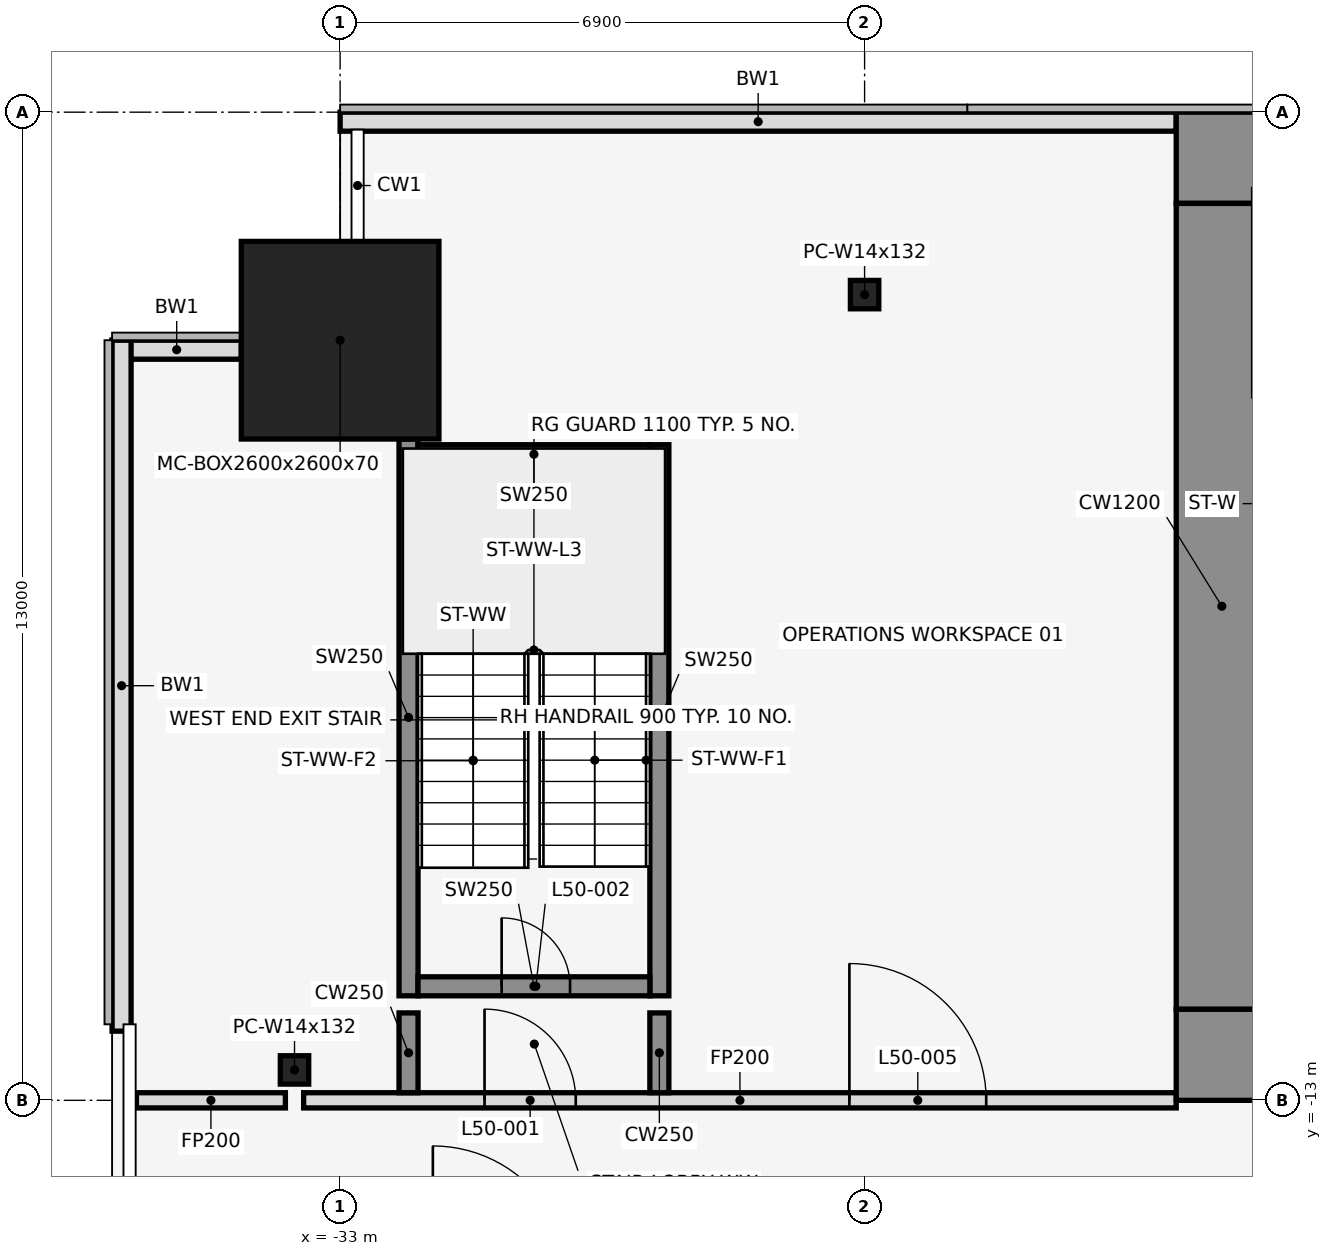
"""IFC4 building model, lengths in metres.
Left out: names, types, materials, properties, quantities, classifications, styles, units other than length and angle.
Written with IfcOpenShell. Run it as: python <this file> out.ifc"""

import sys

from ifc_helpers import new_model, si_unit, direction, frame, frame_2d, origin, origin_2d, place, context, subcontext, project, spatial, rectangle, hollow_rectangle, i_section, extrude, element, fill, save


model = new_model("IFC4")
c1 = context("Model", 3, precision=1e-05, world=origin(), true_north=direction((0.0, 1.0)))
c2 = subcontext(c1, "Body", "Model", "MODEL_VIEW")
j1 = project(units=[si_unit("LENGTHUNIT", "METRE"), si_unit("PLANEANGLEUNIT", "RADIAN")], contexts=[c1])
p1 = place(None, origin())
s1 = spatial("IfcSite", under=j1, at=p1, CompositionType="ELEMENT")
p2 = place(p1, origin())
s2 = spatial("IfcBuilding", under=s1, at=p2, CompositionType="ELEMENT")
p3 = place(p2, frame((0.0, 0.0, 223.7)))
s3 = spatial("IfcBuildingStorey", under=s2, at=p3, CompositionType="ELEMENT", Elevation=223.7)
p4 = place(p3, frame((-33.0, -3.0, 0.0), z_axis=(0.0, 0.0, 1.0), x_axis=(1.0, 0.0, 0.0)))
e1 = element("IfcColumn", 1, at=p4, inside=s3, PredefinedType="COLUMN", context=c2, shape_type="SweptSolid", body=[
    extrude(hollow_rectangle(XDim=2.6, YDim=2.6, WallThickness=0.07, at=origin_2d()), origin(), (0.0, 0.0, 1.0), 4.1),
])
for number, where, z_axis, x_axis in (
    (2, (-26.1, -2.4, 0.0), (0.0, 0.0, 1.0), (1.0, 0.0, 0.0)),
    (3, (-33.6, -12.6, 0.0), (0.0, 0.0, 1.0), (1.0, 0.0, 0.0)),
):
    element("IfcColumn", number, at=place(p3, frame(where, z_axis=z_axis, x_axis=x_axis)), inside=s3, PredefinedType="COLUMN", context=c2, shape_type="SweptSolid", body=[
        extrude(i_section(OverallWidth=0.373, OverallDepth=0.373, WebThickness=0.016, FlangeThickness=0.026, at=origin_2d()), origin(), (0.0, 0.0, 1.0), 4.1),
    ])
p5 = place(p3, frame((-22.0, -0.125, 0.0), z_axis=(0.0, 0.0, 1.0), x_axis=(-1.0, 0.0, 0.0)))
e4 = element("IfcWall", 4, at=p5, inside=s3, PredefinedType="STANDARD", context=c2, shape_type="SweptSolid", body=[
    extrude(rectangle(XDim=11.0, YDim=0.25, at=frame_2d((5.5, 0.0))), origin(), (0.0, 0.0, 1.0), 3.95),
])
p6 = place(p3, frame((-34.3, -3.125, 0.0), z_axis=(0.0, 0.0, 1.0), x_axis=(-1.0, 0.0, 0.0)))
e5 = element("IfcWall", 5, at=p6, inside=s3, PredefinedType="STANDARD", context=c2, shape_type="SweptSolid", body=[
    extrude(rectangle(XDim=1.7, YDim=0.25, at=frame_2d((0.85, 0.0))), origin(), (0.0, 0.0, 1.0), 3.95),
])
p7 = place(p3, frame((-35.875, -3.0, 0.0), z_axis=(0.0, 0.0, 1.0), x_axis=(0.0, -1.0, 0.0)))
e6 = element("IfcWall", 6, at=p7, inside=s3, PredefinedType="STANDARD", context=c2, shape_type="SweptSolid", body=[
    extrude(rectangle(XDim=9.09, YDim=0.25, at=frame_2d((4.545, 0.0))), origin(), (0.0, 0.0, 1.0), 3.95),
])
p8 = place(p3, frame((-32.1, -11.625, 0.0), z_axis=(0.0, 0.0, 1.0), x_axis=(0.0, 1.0, 0.0)))
e7 = element("IfcWall", 7, at=p8, inside=s3, PredefinedType="SHEAR", context=c2, shape_type="SweptSolid", body=[
    extrude(rectangle(XDim=7.325, YDim=0.25, at=frame_2d((3.663, 0.0))), origin(), (0.0, 0.0, 1.0), 4.1),
])
p9 = place(p3, frame((-28.8, -11.625, 0.0), z_axis=(0.0, 0.0, 1.0), x_axis=(0.0, 1.0, 0.0)))
e8 = element("IfcWall", 8, at=p9, inside=s3, PredefinedType="SHEAR", context=c2, shape_type="SweptSolid", body=[
    extrude(rectangle(XDim=7.25, YDim=0.25, at=frame_2d((3.625, 0.0))), origin(), (0.0, 0.0, 1.0), 4.1),
])
p10 = place(p3, frame((-31.975, -11.5, 0.0), z_axis=(0.0, 0.0, 1.0), x_axis=(1.0, 0.0, 0.0)))
e9 = element("IfcWall", 9, at=p10, inside=s3, PredefinedType="SHEAR", context=c2, shape_type="SweptSolid", body=[
    extrude(rectangle(XDim=3.05, YDim=0.25, at=frame_2d((1.525, 0.0))), origin(), (0.0, 0.0, 1.0), 4.1),
])
p11 = place(p10, frame((1.1, 0.0, 0.0)))
e10 = element("IfcOpeningElement", 10, at=p11, cuts=e9, PredefinedType="OPENING", context=c2, shape_type="SweptSolid", body=[
    extrude(rectangle(XDim=0.9, YDim=2.1, at=frame_2d((0.45, 1.05))), frame((0.0, 0.137, 0.0), z_axis=(0.0, -1.0, 0.0), x_axis=(1.0, 0.0, 0.0)), (0.0, 0.0, 1.0), 0.274),
])
p12 = place(p3, frame((-31.975, -4.5, 0.0), z_axis=(0.0, 0.0, 1.0), x_axis=(1.0, 0.0, 0.0)))
e11 = element("IfcWall", 11, at=p12, inside=s3, PredefinedType="SHEAR", context=c2, shape_type="SweptSolid", body=[
    extrude(rectangle(XDim=3.05, YDim=0.25, at=frame_2d((1.525, 0.0))), origin(), (0.0, 0.0, 1.0), 4.1),
])
p13 = place(p3, frame((-35.68, -13.0, 0.0), z_axis=(0.0, 0.0, 1.0), x_axis=(1.0, 0.0, 0.0)))
e12 = element("IfcWall", 12, at=p13, inside=s3, PredefinedType="PARTITIONING", context=c2, shape_type="SweptSolid", body=[
    extrude(rectangle(XDim=1.96, YDim=0.2, at=frame_2d((0.98, 0.0))), origin(), (0.0, 0.0, 1.0), 2.84),
])
p14 = place(p3, frame((-33.48, -13.0, 0.0), z_axis=(0.0, 0.0, 1.0), x_axis=(1.0, 0.0, 0.0)))
e13 = element("IfcWall", 13, at=p14, inside=s3, PredefinedType="PARTITIONING", context=c2, shape_type="SweptSolid", body=[
    extrude(rectangle(XDim=11.48, YDim=0.2, at=frame_2d((5.74, 0.0))), origin(), (0.0, 0.0, 1.0), 2.84),
])
p15 = place(p14, frame((2.38, 0.0, 0.0)))
e14 = element("IfcOpeningElement", 14, at=p15, cuts=e13, PredefinedType="OPENING", context=c2, shape_type="SweptSolid", body=[
    extrude(rectangle(XDim=1.2, YDim=2.1, at=frame_2d((0.6, 1.05))), frame((0.0, 0.112, 0.0), z_axis=(0.0, -1.0, 0.0), x_axis=(1.0, 0.0, 0.0)), (0.0, 0.0, 1.0), 0.224),
])
p16 = place(p14, frame((7.18, 0.0, 0.0)))
e15 = element("IfcOpeningElement", 15, at=p16, cuts=e13, PredefinedType="OPENING", context=c2, shape_type="SweptSolid", body=[
    extrude(rectangle(XDim=1.8, YDim=2.1, at=frame_2d((0.9, 1.05))), frame((0.0, 0.112, 0.0), z_axis=(0.0, -1.0, 0.0), x_axis=(1.0, 0.0, 0.0)), (0.0, 0.0, 1.0), 0.224),
])
for number, where, z_axis, x_axis in (
    (16, (-32.1, -12.9, 0.0), (0.0, 0.0, 1.0), (0.0, 1.0, 0.0)),
    (17, (-28.8, -12.9, 0.0), (0.0, 0.0, 1.0), (0.0, 1.0, 0.0)),
):
    element("IfcWall", number, at=place(p3, frame(where, z_axis=z_axis, x_axis=x_axis)), inside=s3, PredefinedType="SHEAR", context=c2, shape_type="SweptSolid", body=[
        extrude(rectangle(XDim=1.05, YDim=0.25, at=frame_2d((0.525, 0.0))), origin(), (0.0, 0.0, 1.0), 4.1),
    ])
p17 = place(p3, frame((-22.0, -0.6, 0.0), z_axis=(0.0, 0.0, 1.0), x_axis=(1.0, 0.0, 0.0)))
e18 = element("IfcWall", 18, at=p17, inside=s3, PredefinedType="SHEAR", context=c2, shape_type="SweptSolid", body=[
    extrude(rectangle(XDim=44.0, YDim=1.2, at=frame_2d((22.0, 0.0))), origin(), (0.0, 0.0, 1.0), 4.1),
])
p18 = place(p17, frame((18.55, 0.0, 0.0)))
e19 = element("IfcOpeningElement", 19, at=p18, cuts=e18, PredefinedType="OPENING", context=c2, shape_type="SweptSolid", body=[
    extrude(rectangle(XDim=0.9, YDim=2.1, at=frame_2d((0.45, 1.05))), frame((0.0, 0.612, 0.0), z_axis=(0.0, -1.0, 0.0), x_axis=(1.0, 0.0, 0.0)), (0.0, 0.0, 1.0), 1.224),
])
p19 = place(p17, frame((24.55, 0.0, 0.0)))
e20 = element("IfcOpeningElement", 20, at=p19, cuts=e18, PredefinedType="OPENING", context=c2, shape_type="SweptSolid", body=[
    extrude(rectangle(XDim=0.9, YDim=2.1, at=frame_2d((0.45, 1.05))), frame((0.0, 0.612, 0.0), z_axis=(0.0, -1.0, 0.0), x_axis=(1.0, 0.0, 0.0)), (0.0, 0.0, 1.0), 1.224),
])
p20 = place(p3, frame((-22.0, -12.4, 0.0), z_axis=(0.0, 0.0, 1.0), x_axis=(1.0, 0.0, 0.0)))
e21 = element("IfcWall", 21, at=p20, inside=s3, PredefinedType="SHEAR", context=c2, shape_type="SweptSolid", body=[
    extrude(rectangle(XDim=44.0, YDim=1.2, at=frame_2d((22.0, 0.0))), origin(), (0.0, 0.0, 1.0), 4.1),
])
p21 = place(p20, frame((2.2, 0.0, 0.0)))
e22 = element("IfcOpeningElement", 22, at=p21, cuts=e21, PredefinedType="OPENING", context=c2, shape_type="SweptSolid", body=[
    extrude(rectangle(XDim=1.2, YDim=2.1, at=frame_2d((0.6, 1.05))), frame((0.0, 0.612, 0.0), z_axis=(0.0, -1.0, 0.0), x_axis=(1.0, 0.0, 0.0)), (0.0, 0.0, 1.0), 1.224),
])
p22 = place(p20, frame((21.4, 0.0, 0.0)))
e23 = element("IfcOpeningElement", 23, at=p22, cuts=e21, PredefinedType="OPENING", context=c2, shape_type="SweptSolid", body=[
    extrude(rectangle(XDim=1.2, YDim=2.1, at=frame_2d((0.6, 1.05))), frame((0.0, 0.612, 0.0), z_axis=(0.0, -1.0, 0.0), x_axis=(1.0, 0.0, 0.0)), (0.0, 0.0, 1.0), 1.224),
])
p23 = place(p20, frame((40.6, 0.0, 0.0)))
e24 = element("IfcOpeningElement", 24, at=p23, cuts=e21, PredefinedType="OPENING", context=c2, shape_type="SweptSolid", body=[
    extrude(rectangle(XDim=1.2, YDim=2.1, at=frame_2d((0.6, 1.05))), frame((0.0, 0.612, 0.0), z_axis=(0.0, -1.0, 0.0), x_axis=(1.0, 0.0, 0.0)), (0.0, 0.0, 1.0), 1.224),
])
p24 = place(p20, frame((16.0, 0.0, 0.0)))
e25 = element("IfcOpeningElement", 25, at=p24, cuts=e21, PredefinedType="OPENING", context=c2, shape_type="SweptSolid", body=[
    extrude(rectangle(XDim=1.8, YDim=2.1, at=frame_2d((0.9, 1.05))), frame((0.0, 0.612, 0.0), z_axis=(0.0, -1.0, 0.0), x_axis=(1.0, 0.0, 0.0)), (0.0, 0.0, 1.0), 1.224),
])
p25 = place(p20, frame((6.3, 0.0, 0.0)))
e26 = element("IfcOpeningElement", 26, at=p25, cuts=e21, PredefinedType="OPENING", context=c2, shape_type="SweptSolid", body=[
    extrude(rectangle(XDim=1.2, YDim=2.1, at=frame_2d((0.6, 1.05))), frame((0.0, 0.612, 0.0), z_axis=(0.0, -1.0, 0.0), x_axis=(1.0, 0.0, 0.0)), (0.0, 0.0, 1.0), 1.224),
])
p26 = place(p20, frame((26.2, 0.0, 0.0)))
e27 = element("IfcOpeningElement", 27, at=p26, cuts=e21, PredefinedType="OPENING", context=c2, shape_type="SweptSolid", body=[
    extrude(rectangle(XDim=1.8, YDim=2.1, at=frame_2d((0.9, 1.05))), frame((0.0, 0.612, 0.0), z_axis=(0.0, -1.0, 0.0), x_axis=(1.0, 0.0, 0.0)), (0.0, 0.0, 1.0), 1.224),
])
p27 = place(p20, frame((36.5, 0.0, 0.0)))
e28 = element("IfcOpeningElement", 28, at=p27, cuts=e21, PredefinedType="OPENING", context=c2, shape_type="SweptSolid", body=[
    extrude(rectangle(XDim=1.2, YDim=2.1, at=frame_2d((0.6, 1.05))), frame((0.0, 0.612, 0.0), z_axis=(0.0, -1.0, 0.0), x_axis=(1.0, 0.0, 0.0)), (0.0, 0.0, 1.0), 1.224),
])
p28 = place(p3, frame((-21.4, -11.8, 0.0), z_axis=(0.0, 0.0, 1.0), x_axis=(0.0, 1.0, 0.0)))
e29 = element("IfcWall", 29, at=p28, inside=s3, PredefinedType="SHEAR", context=c2, shape_type="SweptSolid", body=[
    extrude(rectangle(XDim=10.6, YDim=1.2, at=frame_2d((5.3, 0.0))), origin(), (0.0, 0.0, 1.0), 4.1),
])
p29 = place(p15, origin())
e30 = element("IfcDoor", 30, at=p29, inside=s3, OperationType="SINGLE_SWING_LEFT", PredefinedType="DOOR", context=c2, shape_type="SweptSolid", body=[
    extrude(rectangle(XDim=1.2, YDim=2.1, at=frame_2d((0.6, 1.05))), frame((0.0, 0.025, 0.0), z_axis=(0.0, -1.0, 0.0), x_axis=(1.0, 0.0, 0.0)), (0.0, 0.0, 1.0), 0.05),
])
fill(e14, e30)
p30 = place(p11, origin())
e31 = element("IfcDoor", 31, at=p30, inside=s3, OperationType="SINGLE_SWING_LEFT", PredefinedType="DOOR", context=c2, shape_type="SweptSolid", body=[
    extrude(rectangle(XDim=0.9, YDim=2.1, at=frame_2d((0.45, 1.05))), frame((0.0, 0.025, 0.0), z_axis=(0.0, -1.0, 0.0), x_axis=(1.0, 0.0, 0.0)), (0.0, 0.0, 1.0), 0.05),
])
fill(e10, e31)
p31 = place(p16, origin())
e32 = element("IfcDoor", 32, at=p31, inside=s3, OperationType="SINGLE_SWING_LEFT", PredefinedType="DOOR", context=c2, shape_type="SweptSolid", body=[
    extrude(rectangle(XDim=1.8, YDim=2.1, at=frame_2d((0.9, 1.05))), frame((0.0, 0.025, 0.0), z_axis=(0.0, -1.0, 0.0), x_axis=(1.0, 0.0, 0.0)), (0.0, 0.0, 1.0), 0.05),
])
fill(e15, e32)
save(model, sys.argv[1])
